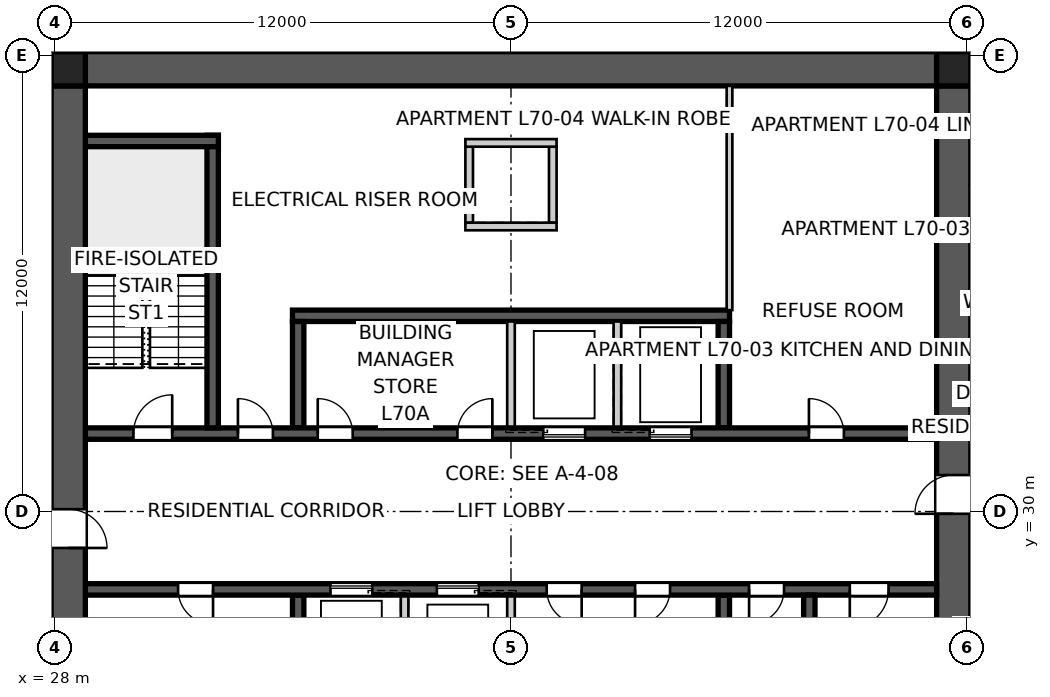
"""IFC4 building model, lengths in metres.
Left out: names, types, materials, properties, quantities, classifications, styles, units other than length and angle.
Written with IfcOpenShell. Run it as: python <this file> out.ifc"""

import sys

from ifc_helpers import new_model, si_unit, direction, frame, frame_2d, origin, origin_2d, place, context, subcontext, project, spatial, polyline, rectangle, outline, extrude, element, fill, save


model = new_model("IFC4")
c1 = context("Model", 3, precision=1e-05, world=origin(), true_north=direction((0.0, 1.0)))
c2 = subcontext(c1, "Body", "Model", "MODEL_VIEW")
j1 = project(units=[si_unit("LENGTHUNIT", "METRE"), si_unit("PLANEANGLEUNIT", "RADIAN")], contexts=[c1])
p1 = place(None, origin())
s1 = spatial("IfcSite", under=j1, at=p1, CompositionType="ELEMENT")
p2 = place(p1, origin())
s2 = spatial("IfcBuilding", under=s1, at=p2, CompositionType="ELEMENT")
p3 = place(p2, frame((0.0, 0.0, 254.0)))
s3 = spatial("IfcBuildingStorey", under=s2, at=p3, CompositionType="ELEMENT", Elevation=254.0)
p4 = place(p3, frame((28.8, 41.65, 0.0), z_axis=(0.0, 0.0, 1.0), x_axis=(1.0, 0.0, 0.0)))
e1 = element("IfcWall", 1, at=p4, inside=s3, PredefinedType="SHEAR", context=c2, shape_type="SweptSolid", body=[
    extrude(outline(polyline([(0.0, -0.45), (22.4, -0.45), (22.4, -0.025), (22.85, -0.025), (22.85, 0.025), (22.4, 0.025), (22.4, 0.45), (0.0, 0.45), (0.0, 0.025), (-0.45, 0.025), (-0.45, -0.025), (0.0, -0.025), (0.0, -0.45)])), origin(), (0.0, 0.0, 1.0), 3.4),
])
p5 = place(p3, frame((51.65, 18.8, 0.0), z_axis=(0.0, 0.0, 1.0), x_axis=(0.0, 1.0, 0.0)))
e2 = element("IfcWall", 2, at=p5, inside=s3, PredefinedType="SHEAR", context=c2, shape_type="SweptSolid", body=[
    extrude(outline(polyline([(0.0, -0.45), (22.4, -0.45), (22.4, -0.025), (22.85, -0.025), (22.85, 0.025), (22.4, 0.025), (22.4, 0.45), (0.0, 0.45), (0.0, 0.025), (-0.45, 0.025), (-0.45, -0.025), (0.0, -0.025), (0.0, -0.45)])), origin(), (0.0, 0.0, 1.0), 3.4),
])
p6 = place(p5, frame((11.14, 0.0, 0.0)))
e3 = element("IfcOpeningElement", 3, at=p6, cuts=e2, PredefinedType="OPENING", context=c2, shape_type="SweptSolid", body=[
    extrude(rectangle(XDim=1.02, YDim=2.4, at=frame_2d((0.51, 1.2))), frame((0.0, 0.46, 0.0), z_axis=(0.0, -1.0, 0.0), x_axis=(1.0, 0.0, 0.0)), (0.0, 0.0, 1.0), 0.92),
])
p7 = place(p3, frame((28.35, 41.2, 0.0), z_axis=(0.0, 0.0, 1.0), x_axis=(0.0, -1.0, 0.0)))
e4 = element("IfcWall", 4, at=p7, inside=s3, PredefinedType="SHEAR", context=c2, shape_type="SweptSolid", body=[
    extrude(outline(polyline([(0.0, -0.45), (22.4, -0.45), (22.4, -0.025), (22.85, -0.025), (22.85, 0.025), (22.4, 0.025), (22.4, 0.45), (0.0, 0.45), (0.0, 0.025), (-0.45, 0.025), (-0.45, -0.025), (0.0, -0.025), (0.0, -0.45)])), origin(), (0.0, 0.0, 1.0), 3.4),
])
p8 = place(p7, frame((11.14, 0.0, 0.0)))
e5 = element("IfcOpeningElement", 5, at=p8, cuts=e4, PredefinedType="OPENING", context=c2, shape_type="SweptSolid", body=[
    extrude(rectangle(XDim=1.02, YDim=2.4, at=frame_2d((0.51, 1.2))), frame((0.0, 0.46, 0.0), z_axis=(0.0, -1.0, 0.0), x_axis=(1.0, 0.0, 0.0)), (0.0, 0.0, 1.0), 0.92),
])
p9 = place(p3, frame((28.8, 32.05, 0.0), z_axis=(0.0, 0.0, 1.0), x_axis=(1.0, 0.0, 0.0)))
e6 = element("IfcWall", 6, at=p9, inside=s3, PredefinedType="SHEAR", context=c2, shape_type="SweptSolid", body=[
    extrude(rectangle(XDim=22.4, YDim=0.3, at=frame_2d((11.2, 0.0))), origin(), (0.0, 0.0, 1.0), 3.4),
])
p10 = place(p9, frame((19.04, 0.0, 0.0)))
e7 = element("IfcOpeningElement", 7, at=p10, cuts=e6, PredefinedType="OPENING", context=c2, shape_type="SweptSolid", body=[
    extrude(rectangle(XDim=0.92, YDim=2.1, at=frame_2d((0.46, 1.05))), frame((0.0, 0.16, 0.0), z_axis=(0.0, -1.0, 0.0), x_axis=(1.0, 0.0, 0.0)), (0.0, 0.0, 1.0), 0.32),
])
p11 = place(p9, frame((1.265, 0.0, 0.0)))
e8 = element("IfcOpeningElement", 8, at=p11, cuts=e6, PredefinedType="OPENING", context=c2, shape_type="SweptSolid", body=[
    extrude(rectangle(XDim=1.02, YDim=2.1, at=frame_2d((0.51, 1.05))), frame((0.0, 0.16, 0.0), z_axis=(0.0, -1.0, 0.0), x_axis=(1.0, 0.0, 0.0)), (0.0, 0.0, 1.0), 0.32),
])
p12 = place(p9, frame((4.015, 0.0, 0.0)))
e9 = element("IfcOpeningElement", 9, at=p12, cuts=e6, PredefinedType="OPENING", context=c2, shape_type="SweptSolid", body=[
    extrude(rectangle(XDim=0.92, YDim=2.1, at=frame_2d((0.46, 1.05))), frame((0.0, 0.16, 0.0), z_axis=(0.0, -1.0, 0.0), x_axis=(1.0, 0.0, 0.0)), (0.0, 0.0, 1.0), 0.32),
])
p13 = place(p9, frame((6.115, 0.0, 0.0)))
e10 = element("IfcOpeningElement", 10, at=p13, cuts=e6, PredefinedType="OPENING", context=c2, shape_type="SweptSolid", body=[
    extrude(rectangle(XDim=0.92, YDim=2.1, at=frame_2d((0.46, 1.05))), frame((0.0, 0.16, 0.0), z_axis=(0.0, -1.0, 0.0), x_axis=(1.0, 0.0, 0.0)), (0.0, 0.0, 1.0), 0.32),
])
p14 = place(p9, frame((9.79, 0.0, 0.0)))
e11 = element("IfcOpeningElement", 11, at=p14, cuts=e6, PredefinedType="OPENING", context=c2, shape_type="SweptSolid", body=[
    extrude(rectangle(XDim=0.92, YDim=2.1, at=frame_2d((0.46, 1.05))), frame((0.0, 0.16, 0.0), z_axis=(0.0, -1.0, 0.0), x_axis=(1.0, 0.0, 0.0)), (0.0, 0.0, 1.0), 0.32),
])
p15 = place(p9, frame((12.05, 0.0, 0.0)))
e12 = element("IfcOpeningElement", 12, at=p15, cuts=e6, PredefinedType="OPENING", context=c2, shape_type="SweptSolid", body=[
    extrude(rectangle(XDim=1.1, YDim=2.1, at=frame_2d((0.55, 1.05))), frame((0.0, 0.16, 0.0), z_axis=(0.0, -1.0, 0.0), x_axis=(1.0, 0.0, 0.0)), (0.0, 0.0, 1.0), 0.32),
])
p16 = place(p9, frame((14.85, 0.0, 0.0)))
e13 = element("IfcOpeningElement", 13, at=p16, cuts=e6, PredefinedType="OPENING", context=c2, shape_type="SweptSolid", body=[
    extrude(rectangle(XDim=1.1, YDim=2.1, at=frame_2d((0.55, 1.05))), frame((0.0, 0.16, 0.0), z_axis=(0.0, -1.0, 0.0), x_axis=(1.0, 0.0, 0.0)), (0.0, 0.0, 1.0), 0.32),
])
p17 = place(p3, frame((51.2, 27.95, 0.0), z_axis=(0.0, 0.0, 1.0), x_axis=(-1.0, 0.0, 0.0)))
e14 = element("IfcWall", 14, at=p17, inside=s3, PredefinedType="SHEAR", context=c2, shape_type="SweptSolid", body=[
    extrude(rectangle(XDim=22.4, YDim=0.3, at=frame_2d((11.2, 0.0))), origin(), (0.0, 0.0, 1.0), 3.4),
])
p18 = place(p17, frame((19.04, 0.0, 0.0)))
e15 = element("IfcOpeningElement", 15, at=p18, cuts=e14, PredefinedType="OPENING", context=c2, shape_type="SweptSolid", body=[
    extrude(rectangle(XDim=0.92, YDim=2.1, at=frame_2d((0.46, 1.05))), frame((0.0, 0.16, 0.0), z_axis=(0.0, -1.0, 0.0), x_axis=(1.0, 0.0, 0.0)), (0.0, 0.0, 1.0), 0.32),
])
p19 = place(p17, frame((1.265, 0.0, 0.0)))
e16 = element("IfcOpeningElement", 16, at=p19, cuts=e14, PredefinedType="OPENING", context=c2, shape_type="SweptSolid", body=[
    extrude(rectangle(XDim=1.02, YDim=2.1, at=frame_2d((0.51, 1.05))), frame((0.0, 0.16, 0.0), z_axis=(0.0, -1.0, 0.0), x_axis=(1.0, 0.0, 0.0)), (0.0, 0.0, 1.0), 0.32),
])
p20 = place(p17, frame((4.015, 0.0, 0.0)))
e17 = element("IfcOpeningElement", 17, at=p20, cuts=e14, PredefinedType="OPENING", context=c2, shape_type="SweptSolid", body=[
    extrude(rectangle(XDim=0.92, YDim=2.1, at=frame_2d((0.46, 1.05))), frame((0.0, 0.16, 0.0), z_axis=(0.0, -1.0, 0.0), x_axis=(1.0, 0.0, 0.0)), (0.0, 0.0, 1.0), 0.32),
])
p21 = place(p17, frame((9.34, 0.0, 0.0)))
e18 = element("IfcOpeningElement", 18, at=p21, cuts=e14, PredefinedType="OPENING", context=c2, shape_type="SweptSolid", body=[
    extrude(rectangle(XDim=0.92, YDim=2.1, at=frame_2d((0.46, 1.05))), frame((0.0, 0.16, 0.0), z_axis=(0.0, -1.0, 0.0), x_axis=(1.0, 0.0, 0.0)), (0.0, 0.0, 1.0), 0.32),
])
p22 = place(p17, frame((7.015, 0.0, 0.0)))
e19 = element("IfcOpeningElement", 19, at=p22, cuts=e14, PredefinedType="OPENING", context=c2, shape_type="SweptSolid", body=[
    extrude(rectangle(XDim=0.92, YDim=2.1, at=frame_2d((0.46, 1.05))), frame((0.0, 0.16, 0.0), z_axis=(0.0, -1.0, 0.0), x_axis=(1.0, 0.0, 0.0)), (0.0, 0.0, 1.0), 0.32),
])
p23 = place(p17, frame((12.05, 0.0, 0.0)))
e20 = element("IfcOpeningElement", 20, at=p23, cuts=e14, PredefinedType="OPENING", context=c2, shape_type="SweptSolid", body=[
    extrude(rectangle(XDim=1.1, YDim=2.1, at=frame_2d((0.55, 1.05))), frame((0.0, 0.16, 0.0), z_axis=(0.0, -1.0, 0.0), x_axis=(1.0, 0.0, 0.0)), (0.0, 0.0, 1.0), 0.32),
])
p24 = place(p17, frame((14.85, 0.0, 0.0)))
e21 = element("IfcOpeningElement", 21, at=p24, cuts=e14, PredefinedType="OPENING", context=c2, shape_type="SweptSolid", body=[
    extrude(rectangle(XDim=1.1, YDim=2.1, at=frame_2d((0.55, 1.05))), frame((0.0, 0.16, 0.0), z_axis=(0.0, -1.0, 0.0), x_axis=(1.0, 0.0, 0.0)), (0.0, 0.0, 1.0), 0.32),
])
p25 = place(p3, frame((34.25, 35.15, 0.0), z_axis=(0.0, 0.0, 1.0), x_axis=(1.0, 0.0, 0.0)))
e22 = element("IfcWall", 22, at=p25, inside=s3, PredefinedType="SHEAR", context=c2, shape_type="SweptSolid", body=[
    extrude(rectangle(XDim=11.5, YDim=0.3, at=frame_2d((5.75, 0.0))), origin(), (0.0, 0.0, 1.0), 3.4),
])
for number, where, z_axis, x_axis in (
    (23, (34.4, 32.2, 0.0), (0.0, 0.0, 1.0), (0.0, 1.0, 0.0)),
    (24, (45.6, 27.8, 0.0), (0.0, 0.0, 1.0), (0.0, -1.0, 0.0)),
):
    element("IfcWall", number, at=place(p3, frame(where, z_axis=z_axis, x_axis=x_axis)), inside=s3, PredefinedType="SHEAR", context=c2, shape_type="SweptSolid", body=[
        extrude(rectangle(XDim=2.8, YDim=0.3, at=frame_2d((1.4, 0.0))), origin(), (0.0, 0.0, 1.0), 3.4),
    ])
for number, where, z_axis, x_axis in (
    (25, (40.0, 32.2, 0.0), (0.0, 0.0, 1.0), (0.0, 1.0, 0.0)),
    (26, (40.0, 27.8, 0.0), (0.0, 0.0, 1.0), (0.0, -1.0, 0.0)),
    (27, (42.8, 32.2, 0.0), (0.0, 0.0, 1.0), (0.0, 1.0, 0.0)),
    (28, (37.2, 27.8, 0.0), (0.0, 0.0, 1.0), (0.0, -1.0, 0.0)),
):
    element("IfcWall", number, at=place(p3, frame(where, z_axis=z_axis, x_axis=x_axis)), inside=s3, PredefinedType="SOLIDWALL", context=c2, shape_type="SweptSolid", body=[
        extrude(rectangle(XDim=2.8, YDim=0.2, at=frame_2d((1.4, 0.0))), origin(), (0.0, 0.0, 1.0), 3.4),
    ])
for number, where, z_axis, x_axis in (
    (29, (45.6, 32.2, 0.0), (0.0, 0.0, 1.0), (0.0, 1.0, 0.0)),
    (30, (34.4, 27.8, 0.0), (0.0, 0.0, 1.0), (0.0, -1.0, 0.0)),
):
    element("IfcWall", number, at=place(p3, frame(where, z_axis=z_axis, x_axis=x_axis)), inside=s3, PredefinedType="SHEAR", context=c2, shape_type="SweptSolid", body=[
        extrude(rectangle(XDim=2.8, YDim=0.3, at=frame_2d((1.4, 0.0))), origin(), (0.0, 0.0, 1.0), 3.4),
    ])
p26 = place(p3, frame((32.15, 32.2, 0.0), z_axis=(0.0, 0.0, 1.0), x_axis=(0.0, 1.0, 0.0)))
e31 = element("IfcWall", 31, at=p26, inside=s3, PredefinedType="SHEAR", context=c2, shape_type="SweptSolid", body=[
    extrude(rectangle(XDim=7.7, YDim=0.3, at=frame_2d((3.85, 0.0))), origin(), (0.0, 0.0, 1.0), 3.4),
])
p27 = place(p3, frame((28.8, 39.75, 0.0), z_axis=(0.0, 0.0, 1.0), x_axis=(1.0, 0.0, 0.0)))
e32 = element("IfcWall", 32, at=p27, inside=s3, PredefinedType="SHEAR", context=c2, shape_type="SweptSolid", body=[
    extrude(rectangle(XDim=3.5, YDim=0.3, at=frame_2d((1.75, 0.0))), origin(), (0.0, 0.0, 1.0), 3.4),
])
p28 = place(p3, frame((47.85, 27.8, 0.0), z_axis=(0.0, 0.0, 1.0), x_axis=(0.0, -1.0, 0.0)))
e33 = element("IfcWall", 33, at=p28, inside=s3, PredefinedType="SHEAR", context=c2, shape_type="SweptSolid", body=[
    extrude(rectangle(XDim=7.7, YDim=0.3, at=frame_2d((3.85, 0.0))), origin(), (0.0, 0.0, 1.0), 3.4),
])
for number, where, z_axis, x_axis in (
    (34, (38.9, 37.6, 0.0), (0.0, 0.0, 1.0), (0.0, 1.0, 0.0)),
    (35, (41.1, 37.6, 0.0), (0.0, 0.0, 1.0), (0.0, 1.0, 0.0)),
):
    element("IfcWall", number, at=place(p3, frame(where, z_axis=z_axis, x_axis=x_axis)), inside=s3, PredefinedType="SOLIDWALL", context=c2, shape_type="SweptSolid", body=[
        extrude(rectangle(XDim=2.0, YDim=0.2, at=frame_2d((1.0, 0.0))), origin(), (0.0, 0.0, 1.0), 3.4),
    ])
for number, where, z_axis, x_axis in (
    (36, (38.8, 37.5, 0.0), (0.0, 0.0, 1.0), (1.0, 0.0, 0.0)),
    (37, (38.8, 39.7, 0.0), (0.0, 0.0, 1.0), (1.0, 0.0, 0.0)),
):
    element("IfcWall", number, at=place(p3, frame(where, z_axis=z_axis, x_axis=x_axis)), inside=s3, PredefinedType="SOLIDWALL", context=c2, shape_type="SweptSolid", body=[
        extrude(rectangle(XDim=2.4, YDim=0.2, at=frame_2d((1.2, 0.0))), origin(), (0.0, 0.0, 1.0), 3.4),
    ])
for number, where, z_axis, x_axis in (
    (38, (51.65, 41.65, 0.0), (0.0, 0.0, 1.0), (1.0, 0.0, 0.0)),
    (39, (28.35, 41.65, 0.0), (0.0, 0.0, 1.0), (1.0, 0.0, 0.0)),
):
    element("IfcColumn", number, at=place(p3, frame(where, z_axis=z_axis, x_axis=x_axis)), inside=s3, PredefinedType="COLUMN", context=c2, shape_type="SweptSolid", body=[
        extrude(rectangle(XDim=0.9, YDim=0.9, at=origin_2d()), origin(), (0.0, 0.0, 1.0), 3.4),
    ])
p29 = place(p3, frame((57.612, 42.332, 0.0), z_axis=(0.0, 0.0, 1.0), x_axis=(-0.819161528122, -0.573562891796, 0.0)))
e40 = element("IfcWall", 40, at=p29, inside=s3, PredefinedType="PARTITIONING", context=c2, shape_type="SweptSolid", body=[
    extrude(rectangle(XDim=6.681, YDim=0.25, at=frame_2d((3.341, 0.0))), origin(), (0.0, 0.0, 1.0), 3.25),
])
p30 = place(p3, frame((45.75, 41.2, 0.0), z_axis=(0.0, 0.0, 1.0), x_axis=(0.0, -1.0, 0.0)))
e41 = element("IfcWall", 41, at=p30, inside=s3, PredefinedType="SOLIDWALL", context=c2, shape_type="SweptSolid", body=[
    extrude(rectangle(XDim=5.9, YDim=0.15, at=frame_2d((2.95, 0.0))), origin(), (0.0, 0.0, 1.0), 3.25),
])
p31 = place(p3, frame((27.9, 41.619, 0.0), z_axis=(0.0, 0.0, 1.0), x_axis=(0.999397924003, 0.034695669724, 0.0)))
e42 = element("IfcWall", 42, at=p31, inside=s3, PredefinedType="PARTITIONING", context=c2, shape_type="SweptSolid", body=[
    extrude(rectangle(XDim=0.901, YDim=0.12, at=frame_2d((0.45, 0.0))), origin(), (0.0, 0.0, 1.0), 3.25),
])
p32 = place(p10, origin())
e43 = element("IfcDoor", 43, at=p32, inside=s3, OperationType="SINGLE_SWING_LEFT", PredefinedType="DOOR", context=c2, shape_type="SweptSolid", body=[
    extrude(rectangle(XDim=0.92, YDim=2.1, at=frame_2d((0.46, 1.05))), frame((0.0, 0.025, 0.0), z_axis=(0.0, -1.0, 0.0), x_axis=(1.0, 0.0, 0.0)), (0.0, 0.0, 1.0), 0.05),
])
fill(e7, e43)
p33 = place(p18, origin())
e44 = element("IfcDoor", 44, at=p33, inside=s3, OperationType="SINGLE_SWING_LEFT", PredefinedType="DOOR", context=c2, shape_type="SweptSolid", body=[
    extrude(rectangle(XDim=0.92, YDim=2.1, at=frame_2d((0.46, 1.05))), frame((0.0, 0.025, 0.0), z_axis=(0.0, -1.0, 0.0), x_axis=(1.0, 0.0, 0.0)), (0.0, 0.0, 1.0), 0.05),
])
fill(e15, e44)
p34 = place(p19, origin())
e45 = element("IfcDoor", 45, at=p34, inside=s3, OperationType="SINGLE_SWING_RIGHT", PredefinedType="DOOR", context=c2, shape_type="SweptSolid", body=[
    extrude(rectangle(XDim=1.02, YDim=2.1, at=frame_2d((0.51, 1.05))), frame((0.0, 0.025, 0.0), z_axis=(0.0, -1.0, 0.0), x_axis=(1.0, 0.0, 0.0)), (0.0, 0.0, 1.0), 0.05),
])
fill(e16, e45)
p35 = place(p11, origin())
e46 = element("IfcDoor", 46, at=p35, inside=s3, OperationType="SINGLE_SWING_RIGHT", PredefinedType="DOOR", context=c2, shape_type="SweptSolid", body=[
    extrude(rectangle(XDim=1.02, YDim=2.1, at=frame_2d((0.51, 1.05))), frame((0.0, 0.025, 0.0), z_axis=(0.0, -1.0, 0.0), x_axis=(1.0, 0.0, 0.0)), (0.0, 0.0, 1.0), 0.05),
])
fill(e8, e46)
p36 = place(p12, origin())
e47 = element("IfcDoor", 47, at=p36, inside=s3, OperationType="SINGLE_SWING_LEFT", PredefinedType="DOOR", context=c2, shape_type="SweptSolid", body=[
    extrude(rectangle(XDim=0.92, YDim=2.1, at=frame_2d((0.46, 1.05))), frame((0.0, 0.025, 0.0), z_axis=(0.0, -1.0, 0.0), x_axis=(1.0, 0.0, 0.0)), (0.0, 0.0, 1.0), 0.05),
])
fill(e9, e47)
p37 = place(p20, origin())
e48 = element("IfcDoor", 48, at=p37, inside=s3, OperationType="SINGLE_SWING_RIGHT", PredefinedType="DOOR", context=c2, shape_type="SweptSolid", body=[
    extrude(rectangle(XDim=0.92, YDim=2.1, at=frame_2d((0.46, 1.05))), frame((0.0, 0.025, 0.0), z_axis=(0.0, -1.0, 0.0), x_axis=(1.0, 0.0, 0.0)), (0.0, 0.0, 1.0), 0.05),
])
fill(e17, e48)
p38 = place(p13, origin())
e49 = element("IfcDoor", 49, at=p38, inside=s3, OperationType="SINGLE_SWING_LEFT", PredefinedType="DOOR", context=c2, shape_type="SweptSolid", body=[
    extrude(rectangle(XDim=0.92, YDim=2.1, at=frame_2d((0.46, 1.05))), frame((0.0, 0.025, 0.0), z_axis=(0.0, -1.0, 0.0), x_axis=(1.0, 0.0, 0.0)), (0.0, 0.0, 1.0), 0.05),
])
fill(e10, e49)
p39 = place(p14, origin())
e50 = element("IfcDoor", 50, at=p39, inside=s3, OperationType="SINGLE_SWING_RIGHT", PredefinedType="DOOR", context=c2, shape_type="SweptSolid", body=[
    extrude(rectangle(XDim=0.92, YDim=2.1, at=frame_2d((0.46, 1.05))), frame((0.0, 0.025, 0.0), z_axis=(0.0, -1.0, 0.0), x_axis=(1.0, 0.0, 0.0)), (0.0, 0.0, 1.0), 0.05),
])
fill(e11, e50)
p40 = place(p21, origin())
e51 = element("IfcDoor", 51, at=p40, inside=s3, OperationType="SINGLE_SWING_LEFT", PredefinedType="DOOR", context=c2, shape_type="SweptSolid", body=[
    extrude(rectangle(XDim=0.92, YDim=2.1, at=frame_2d((0.46, 1.05))), frame((0.0, 0.025, 0.0), z_axis=(0.0, -1.0, 0.0), x_axis=(1.0, 0.0, 0.0)), (0.0, 0.0, 1.0), 0.05),
])
fill(e18, e51)
p41 = place(p22, origin())
e52 = element("IfcDoor", 52, at=p41, inside=s3, OperationType="SINGLE_SWING_RIGHT", PredefinedType="DOOR", context=c2, shape_type="SweptSolid", body=[
    extrude(rectangle(XDim=0.92, YDim=2.1, at=frame_2d((0.46, 1.05))), frame((0.0, 0.025, 0.0), z_axis=(0.0, -1.0, 0.0), x_axis=(1.0, 0.0, 0.0)), (0.0, 0.0, 1.0), 0.05),
])
fill(e19, e52)
p42 = place(p6, origin())
e53 = element("IfcDoor", 53, at=p42, inside=s3, OperationType="SINGLE_SWING_LEFT", PredefinedType="DOOR", context=c2, shape_type="SweptSolid", body=[
    extrude(rectangle(XDim=1.02, YDim=2.4, at=frame_2d((0.51, 1.2))), frame((0.0, 0.025, 0.0), z_axis=(0.0, -1.0, 0.0), x_axis=(1.0, 0.0, 0.0)), (0.0, 0.0, 1.0), 0.05),
])
fill(e3, e53)
p43 = place(p8, origin())
e54 = element("IfcDoor", 54, at=p43, inside=s3, OperationType="SINGLE_SWING_RIGHT", PredefinedType="DOOR", context=c2, shape_type="SweptSolid", body=[
    extrude(rectangle(XDim=1.02, YDim=2.4, at=frame_2d((0.51, 1.2))), frame((0.0, 0.025, 0.0), z_axis=(0.0, -1.0, 0.0), x_axis=(1.0, 0.0, 0.0)), (0.0, 0.0, 1.0), 0.05),
])
fill(e5, e54)
p44 = place(p15, origin())
e55 = element("IfcDoor", 55, at=p44, inside=s3, OperationType="SLIDING_TO_LEFT", PredefinedType="DOOR", context=c2, shape_type="SweptSolid", body=[
    extrude(rectangle(XDim=1.1, YDim=2.1, at=frame_2d((0.55, 1.05))), frame((0.0, 0.025, 0.0), z_axis=(0.0, -1.0, 0.0), x_axis=(1.0, 0.0, 0.0)), (0.0, 0.0, 1.0), 0.05),
])
fill(e12, e55)
p45 = place(p23, origin())
e56 = element("IfcDoor", 56, at=p45, inside=s3, OperationType="SLIDING_TO_LEFT", PredefinedType="DOOR", context=c2, shape_type="SweptSolid", body=[
    extrude(rectangle(XDim=1.1, YDim=2.1, at=frame_2d((0.55, 1.05))), frame((0.0, 0.025, 0.0), z_axis=(0.0, -1.0, 0.0), x_axis=(1.0, 0.0, 0.0)), (0.0, 0.0, 1.0), 0.05),
])
fill(e20, e56)
p46 = place(p16, origin())
e57 = element("IfcDoor", 57, at=p46, inside=s3, OperationType="SLIDING_TO_LEFT", PredefinedType="DOOR", context=c2, shape_type="SweptSolid", body=[
    extrude(rectangle(XDim=1.1, YDim=2.1, at=frame_2d((0.55, 1.05))), frame((0.0, 0.025, 0.0), z_axis=(0.0, -1.0, 0.0), x_axis=(1.0, 0.0, 0.0)), (0.0, 0.0, 1.0), 0.05),
])
fill(e13, e57)
p47 = place(p24, origin())
e58 = element("IfcDoor", 58, at=p47, inside=s3, OperationType="SLIDING_TO_LEFT", PredefinedType="DOOR", context=c2, shape_type="SweptSolid", body=[
    extrude(rectangle(XDim=1.1, YDim=2.1, at=frame_2d((0.55, 1.05))), frame((0.0, 0.025, 0.0), z_axis=(0.0, -1.0, 0.0), x_axis=(1.0, 0.0, 0.0)), (0.0, 0.0, 1.0), 0.05),
])
fill(e21, e58)
save(model, sys.argv[1])
